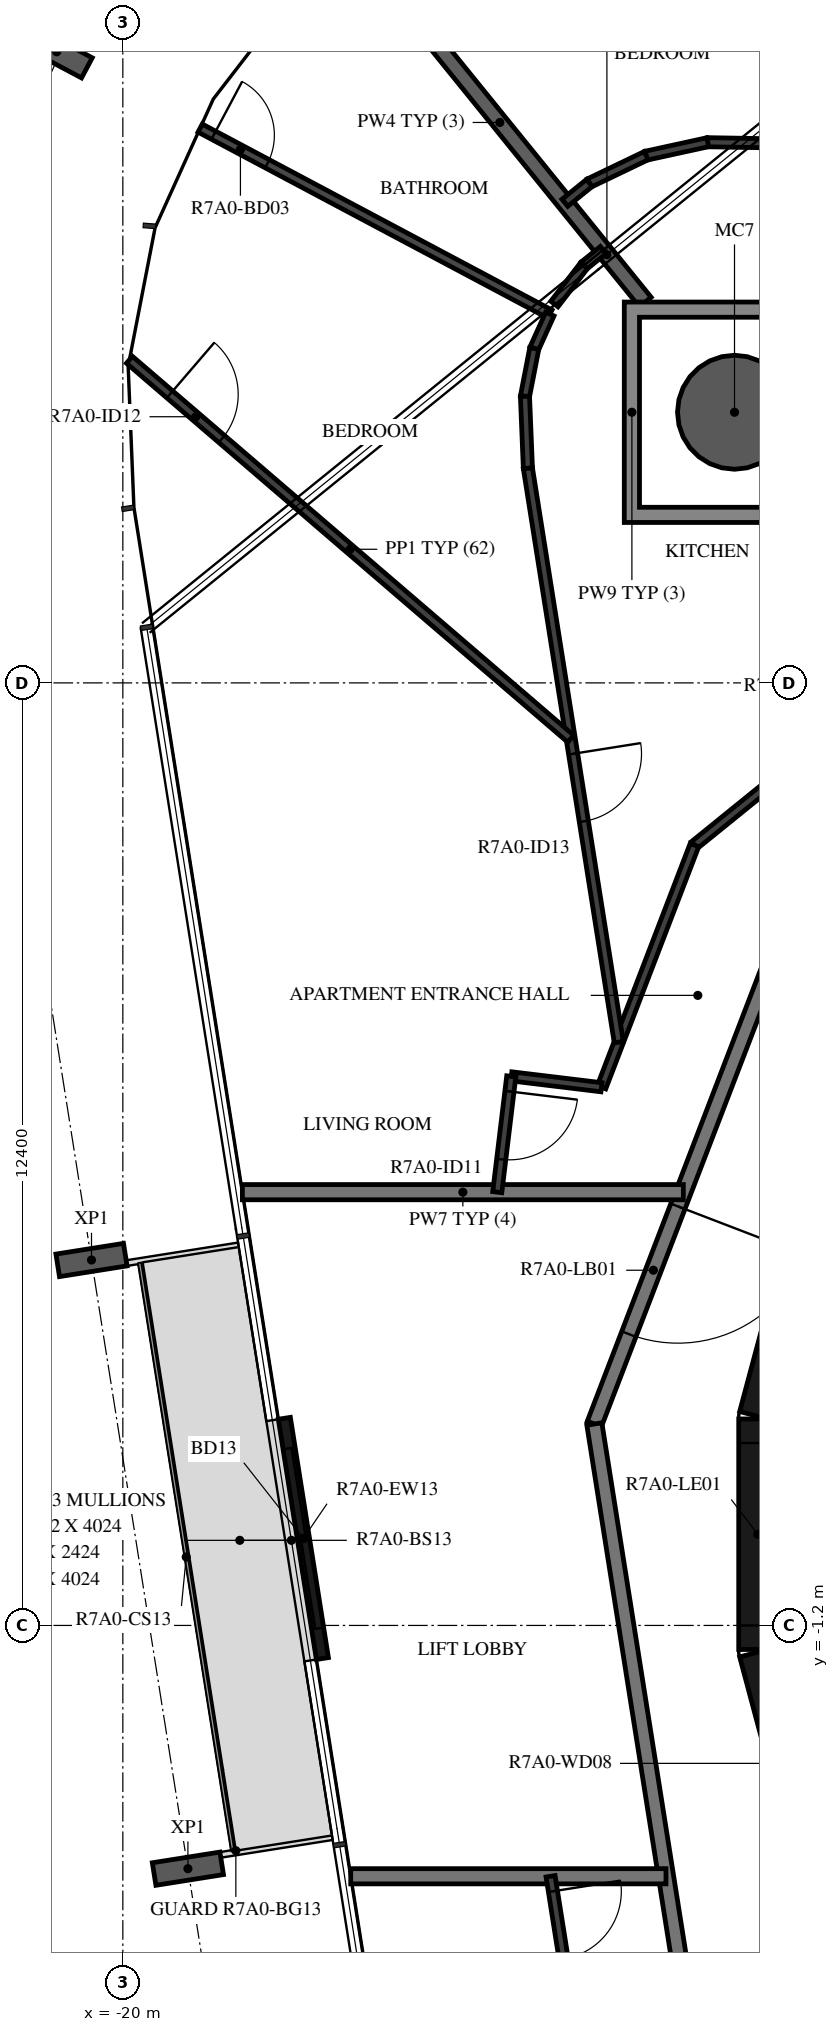
"""IFC4 building model, lengths in metres.
Left out: names, types, materials, properties, quantities, classifications, styles, units other than length and angle.
Written with IfcOpenShell. Run it as: python <this file> out.ifc"""

import sys

from ifc_helpers import new_model, si_unit, direction, frame, frame_2d, origin, origin_2d, place, context, subcontext, project, spatial, polyline, rectangle, hollow_circle, i_section, outline, extrude, element, fill, save


model = new_model("IFC4")
c1 = context("Model", 3, precision=1e-05, world=origin(), true_north=direction((0.0, 1.0)))
c2 = subcontext(c1, "Body", "Model", "MODEL_VIEW")
j1 = project(units=[si_unit("LENGTHUNIT", "METRE"), si_unit("PLANEANGLEUNIT", "RADIAN")], contexts=[c1])
p1 = place(None, origin())
s1 = spatial("IfcSite", under=j1, at=p1, CompositionType="ELEMENT")
p2 = place(p1, origin())
s2 = spatial("IfcBuilding", under=s1, at=p2, CompositionType="ELEMENT")
p3 = place(p2, frame((0.0, 0.0, 270.4)))
s3 = spatial("IfcBuildingStorey", under=s2, at=p3, CompositionType="ELEMENT", Elevation=270.4)
p4 = place(p3, frame((-11.953, 14.76, -0.38), z_axis=(0.0, 0.0, 1.0), x_axis=(1.0, 0.0, 0.0)))
e1 = element("IfcColumn", 1, at=p4, inside=s3, PredefinedType="COLUMN", context=c2, shape_type="SweptSolid", body=[
    extrude(hollow_circle(Radius=0.75, WallThickness=0.035, at=origin_2d()), origin(), (0.0, 0.0, 1.0), 3.5),
])
for number, where, z_axis, x_axis in (
    (2, (-20.87, 19.503, -0.38), (0.0, 0.0, 1.0), (0.47, 0.883, 0.0)),
    (3, (-20.412, 3.608, -0.38), (0.0, 0.0, 1.0), (-0.156, 0.988, 0.0)),
    (4, (-19.144, -4.4, -0.38), (0.0, 0.0, 1.0), (-0.156, 0.988, 0.0)),
):
    element("IfcColumn", number, at=place(p3, frame(where, z_axis=z_axis, x_axis=x_axis)), inside=s3, PredefinedType="COLUMN", context=c2, shape_type="SweptSolid", body=[
        extrude(i_section(OverallWidth=0.3, OverallDepth=0.9, WebThickness=0.019, FlangeThickness=0.035, FilletRadius=0.03, at=origin_2d()), origin(), (0.0, 0.0, 1.0), 3.5),
    ])
p5 = place(p3, frame((-17.875, 1.525, 0.0), z_axis=(0.0, 0.0, 1.0), x_axis=(0.156413134305, -0.987691718816, 0.0)))
e5 = element("IfcWall", 5, at=p5, inside=s3, PredefinedType="STANDARD", context=c2, shape_type="SweptSolid", body=[
    extrude(rectangle(XDim=3.2, YDim=0.16, at=frame_2d((1.6, 0.0))), origin(), (0.0, 0.0, 1.0), 3.12),
])
p6 = place(p5, frame((0.4, 0.0, 0.0)))
e6 = element("IfcOpeningElement", 6, at=p6, cuts=e5, PredefinedType="OPENING", context=c2, shape_type="SweptSolid", body=[
    extrude(rectangle(XDim=2.4, YDim=2.4, at=frame_2d((1.2, 1.2))), frame((0.0, 0.09, 0.0), z_axis=(0.0, -1.0, 0.0), x_axis=(1.0, 0.0, 0.0)), (0.0, 0.0, 1.0), 0.18),
])
p7 = place(p3, frame((-10.858, 4.479, 0.0), z_axis=(0.0, 0.0, 1.0), x_axis=(-0.258734743916, -0.965948410781, 0.0)))
e7 = element("IfcWall", 7, at=p7, inside=s3, PredefinedType="SHEAR", context=c2, shape_type="SweptSolid", body=[
    extrude(rectangle(XDim=3.033, YDim=0.5, at=frame_2d((1.516, 0.0))), origin(), (0.0, 0.0, 1.0), 3.12),
])
p8 = place(p3, frame((-11.647, 1.516, 0.0), z_axis=(0.0, 0.0, 1.0), x_axis=(0.0, -1.0, 0.0)))
e8 = element("IfcWall", 8, at=p8, inside=s3, PredefinedType="SHEAR", context=c2, shape_type="SweptSolid", body=[
    extrude(rectangle(XDim=3.033, YDim=0.5, at=frame_2d((1.516, 0.0))), origin(), (0.0, 0.0, 1.0), 3.12),
])
p9 = place(p8, frame((0.316, 0.0, 0.0)))
e9 = element("IfcOpeningElement", 9, at=p9, cuts=e8, PredefinedType="OPENING", context=c2, shape_type="SweptSolid", body=[
    extrude(rectangle(XDim=2.4, YDim=2.1, at=frame_2d((1.2, 1.05))), frame((0.0, 0.26, 0.0), z_axis=(0.0, -1.0, 0.0), x_axis=(1.0, 0.0, 0.0)), (0.0, 0.0, 1.0), 0.52),
])
p10 = place(p3, frame((-11.643, -1.55, 0.0), z_axis=(0.0, 0.0, 1.0), x_axis=(0.258734743916, -0.965948410781, 0.0)))
e10 = element("IfcWall", 10, at=p10, inside=s3, PredefinedType="SHEAR", context=c2, shape_type="SweptSolid", body=[
    extrude(rectangle(XDim=3.033, YDim=0.5, at=frame_2d((1.516, 0.0))), origin(), (0.0, 0.0, 1.0), 3.12),
])
p11 = place(p10, frame((1.066, 0.0, 0.0)))
e11 = element("IfcOpeningElement", 11, at=p11, cuts=e10, PredefinedType="OPENING", context=c2, shape_type="SweptSolid", body=[
    extrude(rectangle(XDim=0.9, YDim=2.1, at=frame_2d((0.45, 1.05))), frame((0.0, 0.26, 0.0), z_axis=(0.0, -1.0, 0.0), x_axis=(1.0, 0.0, 0.0)), (0.0, 0.0, 1.0), 0.52),
])
p12 = place(p3, frame((-11.223, 8.154, 0.0), z_axis=(0.0, 0.0, 1.0), x_axis=(-0.358341090983, -0.93359073609, 0.0)))
e12 = element("IfcWall", 12, at=p12, inside=s3, PredefinedType="STANDARD", context=c2, shape_type="SweptSolid", body=[
    extrude(rectangle(XDim=7.181, YDim=0.2, at=frame_2d((3.59, 0.0))), origin(), (0.0, 0.0, 1.0), 3.12),
])
p13 = place(p12, frame((4.114, 0.0, 0.0)))
e13 = element("IfcOpeningElement", 13, at=p13, cuts=e12, PredefinedType="OPENING", context=c2, shape_type="SweptSolid", body=[
    extrude(rectangle(XDim=1.8, YDim=2.1, at=frame_2d((0.9, 1.05))), frame((0.0, 0.11, 0.0), z_axis=(0.0, -1.0, 0.0), x_axis=(1.0, 0.0, 0.0)), (0.0, 0.0, 1.0), 0.22),
])
p14 = place(p3, frame((-13.797, 1.45, 0.0), z_axis=(0.0, 0.0, 1.0), x_axis=(0.156421704315, -0.987690361611, 0.0)))
e14 = element("IfcWall", 14, at=p14, inside=s3, PredefinedType="STANDARD", context=c2, shape_type="SweptSolid", body=[
    extrude(rectangle(XDim=7.181, YDim=0.2, at=frame_2d((3.591, 0.0))), origin(), (0.0, 0.0, 1.0), 3.12),
])
p15 = place(p3, frame((-12.626, 4.5, 0.0), z_axis=(0.0, 0.0, 1.0), x_axis=(-1.0, 0.0, 0.0)))
e15 = element("IfcWall", 15, at=p15, inside=s3, PredefinedType="STANDARD", context=c2, shape_type="SweptSolid", body=[
    extrude(rectangle(XDim=5.802, YDim=0.2, at=frame_2d((2.901, 0.0))), origin(), (0.0, 0.0, 1.0), 3.12),
])
p16 = place(p3, frame((-17.002, -4.5, 0.0), z_axis=(0.0, 0.0, 1.0), x_axis=(1.0, 0.0, 0.0)))
e16 = element("IfcWall", 16, at=p16, inside=s3, PredefinedType="STANDARD", context=c2, shape_type="SweptSolid", body=[
    extrude(rectangle(XDim=4.148, YDim=0.2, at=frame_2d((2.074, 0.0))), origin(), (0.0, 0.0, 1.0), 3.12),
])
p17 = place(p3, frame((-16.953, 20.936, 0.0), z_axis=(0.0, 0.0, 1.0), x_axis=(0.629331057166, -0.777137324085, 0.0)))
e17 = element("IfcWall", 17, at=p17, inside=s3, PredefinedType="STANDARD", context=c2, shape_type="SweptSolid", body=[
    extrude(rectangle(XDim=6.08, YDim=0.2, at=frame_2d((3.04, 0.0))), origin(), (0.0, 0.0, 1.0), 3.12),
])
p18 = place(p3, frame((-11.477, 18.299, 0.0), z_axis=(0.0, 0.0, 1.0), x_axis=(-0.999848939146, 0.017380992165, 0.0)))
e18 = element("IfcWall", 18, at=p18, inside=s3, PredefinedType="PARTITIONING", context=c2, shape_type="SweptSolid", body=[
    extrude(rectangle(XDim=0.829, YDim=0.12, at=frame_2d((0.415, 0.0))), origin(), (0.0, 0.0, 1.0), 3.12),
])
p19 = place(p3, frame((-12.305, 18.313, 0.0), z_axis=(0.0, 0.0, 1.0), x_axis=(-0.976949932909, -0.21346856581, 0.0)))
e19 = element("IfcWall", 19, at=p19, inside=s3, PredefinedType="PARTITIONING", context=c2, shape_type="SweptSolid", body=[
    extrude(rectangle(XDim=0.829, YDim=0.12, at=frame_2d((0.415, 0.0))), origin(), (0.0, 0.0, 1.0), 3.12),
])
p20 = place(p3, frame((-13.115, 18.136, 0.0), z_axis=(0.0, 0.0, 1.0), x_axis=(-0.901385111422, -0.43301833784, 0.0)))
e20 = element("IfcWall", 20, at=p20, inside=s3, PredefinedType="PARTITIONING", context=c2, shape_type="SweptSolid", body=[
    extrude(rectangle(XDim=0.829, YDim=0.12, at=frame_2d((0.415, 0.0))), origin(), (0.0, 0.0, 1.0), 3.12),
])
p21 = place(p3, frame((-13.862, 17.777, 0.0), z_axis=(0.0, 0.0, 1.0), x_axis=(-0.776888119785, -0.629638665694, 0.0)))
e21 = element("IfcWall", 21, at=p21, inside=s3, PredefinedType="PARTITIONING", context=c2, shape_type="SweptSolid", body=[
    extrude(rectangle(XDim=0.415, YDim=0.12, at=frame_2d((0.207, 0.0))), origin(), (0.0, 0.0, 1.0), 3.12),
])
p22 = place(p3, frame((-9.393, 11.566, 0.0), z_axis=(0.0, 0.0, 1.0), x_axis=(-0.777100258587, -0.629376825205, 0.0)))
e22 = element("IfcWall", 22, at=p22, inside=s3, PredefinedType="PARTITIONING", context=c2, shape_type="SweptSolid", body=[
    extrude(rectangle(XDim=3.971, YDim=0.12, at=frame_2d((1.986, 0.0))), origin(), (0.0, 0.0, 1.0), 3.12),
])
p23 = place(p22, frame((0.2, 0.0, 0.0)))
e23 = element("IfcOpeningElement", 23, at=p23, cuts=e22, PredefinedType="OPENING", context=c2, shape_type="SweptSolid", body=[
    extrude(rectangle(XDim=0.9, YDim=2.1, at=frame_2d((0.45, 1.05))), frame((0.0, 0.07, 0.0), z_axis=(0.0, -1.0, 0.0), x_axis=(1.0, 0.0, 0.0)), (0.0, 0.0, 1.0), 0.14),
])
p24 = place(p3, frame((-12.479, 9.067, 0.0), z_axis=(0.0, 0.0, 1.0), x_axis=(-0.358394302064, -0.933570310286, 0.0)))
e24 = element("IfcWall", 24, at=p24, inside=s3, PredefinedType="PARTITIONING", context=c2, shape_type="SweptSolid", body=[
    extrude(rectangle(XDim=3.414, YDim=0.12, at=frame_2d((1.707, 0.0))), origin(), (0.0, 0.0, 1.0), 3.12),
])
p25 = place(p3, frame((-13.703, 5.88, 0.0), z_axis=(0.0, 0.0, 1.0), x_axis=(-0.992763323859, 0.120087396509, 0.0)))
e25 = element("IfcWall", 25, at=p25, inside=s3, PredefinedType="PARTITIONING", context=c2, shape_type="SweptSolid", body=[
    extrude(rectangle(XDim=1.195, YDim=0.12, at=frame_2d((0.598, 0.0))), origin(), (0.0, 0.0, 1.0), 3.12),
])
p26 = place(p3, frame((-14.89, 6.024, 0.0), z_axis=(0.0, 0.0, 1.0), x_axis=(-0.120255360044, -0.992742992109, 0.0)))
e26 = element("IfcWall", 26, at=p26, inside=s3, PredefinedType="PARTITIONING", context=c2, shape_type="SweptSolid", body=[
    extrude(rectangle(XDim=1.535, YDim=0.12, at=frame_2d((0.768, 0.0))), origin(), (0.0, 0.0, 1.0), 3.12),
])
p27 = place(p26, frame((0.2, 0.0, 0.0)))
e27 = element("IfcOpeningElement", 27, at=p27, cuts=e26, PredefinedType="OPENING", context=c2, shape_type="SweptSolid", body=[
    extrude(rectangle(XDim=0.9, YDim=2.1, at=frame_2d((0.45, 1.05))), frame((0.0, 0.07, 0.0), z_axis=(0.0, -1.0, 0.0), x_axis=(1.0, 0.0, 0.0)), (0.0, 0.0, 1.0), 0.14),
])
p28 = place(p3, frame((-14.323, 16.184, 0.0), z_axis=(0.0, 0.0, 1.0), x_axis=(0.611198506308, 0.791477343887, 0.0)))
e28 = element("IfcWall", 28, at=p28, inside=s3, PredefinedType="PARTITIONING", context=c2, shape_type="SweptSolid", body=[
    extrude(rectangle(XDim=0.642, YDim=0.12, at=frame_2d((0.321, 0.0))), origin(), (0.0, 0.0, 1.0), 3.12),
])
p29 = place(p3, frame((-13.93, 16.692, 0.0), z_axis=(0.0, 0.0, 1.0), x_axis=(0.776695397137, 0.62987638475, 0.0)))
e29 = element("IfcWall", 29, at=p29, inside=s3, PredefinedType="PARTITIONING", context=c2, shape_type="SweptSolid", body=[
    extrude(rectangle(XDim=0.321, YDim=0.12, at=frame_2d((0.161, 0.0))), origin(), (0.0, 0.0, 1.0), 3.12),
])
p30 = place(p3, frame((-18.983, 18.499, 0.0), z_axis=(0.0, 0.0, 1.0), x_axis=(0.882948840489, -0.469469216328, 0.0)))
e30 = element("IfcWall", 30, at=p30, inside=s3, PredefinedType="PARTITIONING", context=c2, shape_type="SweptSolid", body=[
    extrude(rectangle(XDim=5.211, YDim=0.12, at=frame_2d((2.605, 0.0))), origin(), (0.0, 0.0, 1.0), 2.73),
])
p31 = place(p30, frame((0.2, 0.0, 0.0)))
e31 = element("IfcOpeningElement", 31, at=p31, cuts=e30, PredefinedType="OPENING", context=c2, shape_type="SweptSolid", body=[
    extrude(rectangle(XDim=0.8, YDim=2.1, at=frame_2d((0.4, 1.05))), frame((0.0, 0.07, 0.0), z_axis=(0.0, -1.0, 0.0), x_axis=(1.0, 0.0, 0.0)), (0.0, 0.0, 1.0), 0.14),
])
p32 = place(p3, frame((-14.382, 16.052, 0.0), z_axis=(0.0, 0.0, 1.0), x_axis=(-0.412099912529, -0.911138662385, 0.0)))
e32 = element("IfcWall", 32, at=p32, inside=s3, PredefinedType="PARTITIONING", context=c2, shape_type="SweptSolid", body=[
    extrude(rectangle(XDim=0.497, YDim=0.12, at=frame_2d((0.249, 0.0))), origin(), (0.0, 0.0, 1.0), 3.12),
])
p33 = place(p3, frame((-14.587, 15.6, 0.0), z_axis=(0.0, 0.0, 1.0), x_axis=(-0.190920556667, -0.98160549155, 0.0)))
e33 = element("IfcWall", 33, at=p33, inside=s3, PredefinedType="PARTITIONING", context=c2, shape_type="SweptSolid", body=[
    extrude(rectangle(XDim=0.642, YDim=0.12, at=frame_2d((0.321, 0.0))), origin(), (0.0, 0.0, 1.0), 3.12),
])
p34 = place(p3, frame((-14.709, 14.969, 0.0), z_axis=(0.0, 0.0, 1.0), x_axis=(0.040729848009, -0.999170195453, 0.0)))
e34 = element("IfcWall", 34, at=p34, inside=s3, PredefinedType="PARTITIONING", context=c2, shape_type="SweptSolid", body=[
    extrude(rectangle(XDim=0.947, YDim=0.12, at=frame_2d((0.474, 0.0))), origin(), (0.0, 0.0, 1.0), 3.12),
])
p35 = place(p3, frame((-14.671, 14.023, 0.0), z_axis=(0.0, 0.0, 1.0), x_axis=(0.156438190471, -0.987687750538, 0.0)))
e35 = element("IfcWall", 35, at=p35, inside=s3, PredefinedType="PARTITIONING", context=c2, shape_type="SweptSolid", body=[
    extrude(rectangle(XDim=7.644, YDim=0.12, at=frame_2d((3.822, 0.0))), origin(), (0.0, 0.0, 1.0), 3.12),
])
p36 = place(p35, frame((3.803, 0.0, 0.0)))
e36 = element("IfcOpeningElement", 36, at=p36, cuts=e35, PredefinedType="OPENING", context=c2, shape_type="SweptSolid", body=[
    extrude(rectangle(XDim=0.9, YDim=2.1, at=frame_2d((0.45, 1.05))), frame((0.0, 0.07, 0.0), z_axis=(0.0, -1.0, 0.0), x_axis=(1.0, 0.0, 0.0)), (0.0, 0.0, 1.0), 0.14),
])
p37 = place(p3, frame((-19.913, 15.451, 0.0), z_axis=(0.0, 0.0, 1.0), x_axis=(0.758623462992, -0.6515293097, 0.0)))
e37 = element("IfcWall", 37, at=p37, inside=s3, PredefinedType="PARTITIONING", context=c2, shape_type="SweptSolid", body=[
    extrude(rectangle(XDim=7.653, YDim=0.12, at=frame_2d((3.826, 0.0))), origin(), (0.0, 0.0, 1.0), 3.12),
])
p38 = place(p37, frame((0.7, 0.0, 0.0)))
e38 = element("IfcOpeningElement", 38, at=p38, cuts=e37, PredefinedType="OPENING", context=c2, shape_type="SweptSolid", body=[
    extrude(rectangle(XDim=0.9, YDim=2.1, at=frame_2d((0.45, 1.05))), frame((0.0, 0.07, 0.0), z_axis=(0.0, -1.0, 0.0), x_axis=(1.0, 0.0, 0.0)), (0.0, 0.0, 1.0), 0.14),
])
p39 = place(p3, frame((-14.373, -4.5, 0.0), z_axis=(0.0, 0.0, 1.0), x_axis=(0.156437152886, -0.987687914878, 0.0)))
e39 = element("IfcWall", 39, at=p39, inside=s3, PredefinedType="PARTITIONING", context=c2, shape_type="SweptSolid", body=[
    extrude(rectangle(XDim=1.796, YDim=0.12, at=frame_2d((0.898, 0.0))), origin(), (0.0, 0.0, 1.0), 3.12),
])
p40 = place(p39, frame((0.2, 0.0, 0.0)))
e40 = element("IfcOpeningElement", 40, at=p40, cuts=e39, PredefinedType="OPENING", context=c2, shape_type="SweptSolid", body=[
    extrude(rectangle(XDim=0.9, YDim=2.1, at=frame_2d((0.45, 1.05))), frame((0.0, 0.07, 0.0), z_axis=(0.0, -1.0, 0.0), x_axis=(1.0, 0.0, 0.0)), (0.0, 0.0, 1.0), 0.14),
])
p41 = place(p3, origin())
e41 = element("IfcWall", 41, at=p41, inside=s3, PredefinedType="STANDARD", context=c2, shape_type="SweptSolid", body=[
    extrude(outline(polyline([(-10.503, 16.21), (-10.503, 13.311), (-13.403, 13.311), (-13.403, 16.21), (-10.503, 16.21)]), holes=[polyline([(-13.203, 13.51), (-10.703, 13.51), (-10.703, 16.01), (-13.203, 16.01), (-13.203, 13.51)])]), origin(), (0.0, 0.0, 1.0), 3.12),
])
p42 = place(p6, origin())
e42 = element("IfcDoor", 42, at=p42, inside=s3, OperationType="DOUBLE_DOOR_SLIDING", PredefinedType="DOOR", context=c2, shape_type="SweptSolid", body=[
    extrude(rectangle(XDim=2.4, YDim=2.4, at=frame_2d((1.2, 1.2))), frame((0.0, 0.025, 0.0), z_axis=(0.0, -1.0, 0.0), x_axis=(1.0, 0.0, 0.0)), (0.0, 0.0, 1.0), 0.05),
])
fill(e6, e42)
p43 = place(p9, origin())
e43 = element("IfcDoor", 43, at=p43, inside=s3, OperationType="DOUBLE_DOOR_SINGLE_SWING", PredefinedType="DOOR", context=c2, shape_type="SweptSolid", body=[
    extrude(rectangle(XDim=2.4, YDim=2.1, at=frame_2d((1.2, 1.05))), frame((0.0, 0.025, 0.0), z_axis=(0.0, -1.0, 0.0), x_axis=(1.0, 0.0, 0.0)), (0.0, 0.0, 1.0), 0.05),
])
fill(e9, e43)
p44 = place(p27, origin())
e44 = element("IfcDoor", 44, at=p44, inside=s3, OperationType="SINGLE_SWING_LEFT", PredefinedType="DOOR", context=c2, shape_type="SweptSolid", body=[
    extrude(rectangle(XDim=0.9, YDim=2.1, at=frame_2d((0.45, 1.05))), frame((0.0, 0.025, 0.0), z_axis=(0.0, -1.0, 0.0), x_axis=(1.0, 0.0, 0.0)), (0.0, 0.0, 1.0), 0.05),
])
fill(e27, e44)
p45 = place(p38, origin())
e45 = element("IfcDoor", 45, at=p45, inside=s3, OperationType="SINGLE_SWING_LEFT", PredefinedType="DOOR", context=c2, shape_type="SweptSolid", body=[
    extrude(rectangle(XDim=0.9, YDim=2.1, at=frame_2d((0.45, 1.05))), frame((0.0, 0.025, 0.0), z_axis=(0.0, -1.0, 0.0), x_axis=(1.0, 0.0, 0.0)), (0.0, 0.0, 1.0), 0.05),
])
fill(e38, e45)
p46 = place(p31, origin())
e46 = element("IfcDoor", 46, at=p46, inside=s3, OperationType="SINGLE_SWING_LEFT", PredefinedType="DOOR", context=c2, shape_type="SweptSolid", body=[
    extrude(rectangle(XDim=0.8, YDim=2.1, at=frame_2d((0.4, 1.05))), frame((0.0, 0.025, 0.0), z_axis=(0.0, -1.0, 0.0), x_axis=(1.0, 0.0, 0.0)), (0.0, 0.0, 1.0), 0.05),
])
fill(e31, e46)
p47 = place(p36, origin())
e47 = element("IfcDoor", 47, at=p47, inside=s3, OperationType="SINGLE_SWING_RIGHT", PredefinedType="DOOR", context=c2, shape_type="SweptSolid", body=[
    extrude(rectangle(XDim=0.9, YDim=2.1, at=frame_2d((0.45, 1.05))), frame((0.0, 0.025, 0.0), z_axis=(0.0, -1.0, 0.0), x_axis=(1.0, 0.0, 0.0)), (0.0, 0.0, 1.0), 0.05),
])
fill(e36, e47)
p48 = place(p40, origin())
e48 = element("IfcDoor", 48, at=p48, inside=s3, OperationType="SINGLE_SWING_RIGHT", PredefinedType="DOOR", context=c2, shape_type="SweptSolid", body=[
    extrude(rectangle(XDim=0.9, YDim=2.1, at=frame_2d((0.45, 1.05))), frame((0.0, 0.025, 0.0), z_axis=(0.0, -1.0, 0.0), x_axis=(1.0, 0.0, 0.0)), (0.0, 0.0, 1.0), 0.05),
])
fill(e40, e48)
p49 = place(p13, origin())
e49 = element("IfcDoor", 49, at=p49, inside=s3, OperationType="DOUBLE_DOOR_SINGLE_SWING", PredefinedType="DOOR", context=c2, shape_type="SweptSolid", body=[
    extrude(rectangle(XDim=1.8, YDim=2.1, at=frame_2d((0.9, 1.05))), frame((0.0, 0.025, 0.0), z_axis=(0.0, -1.0, 0.0), x_axis=(1.0, 0.0, 0.0)), (0.0, 0.0, 1.0), 0.05),
])
fill(e13, e49)
save(model, sys.argv[1])
